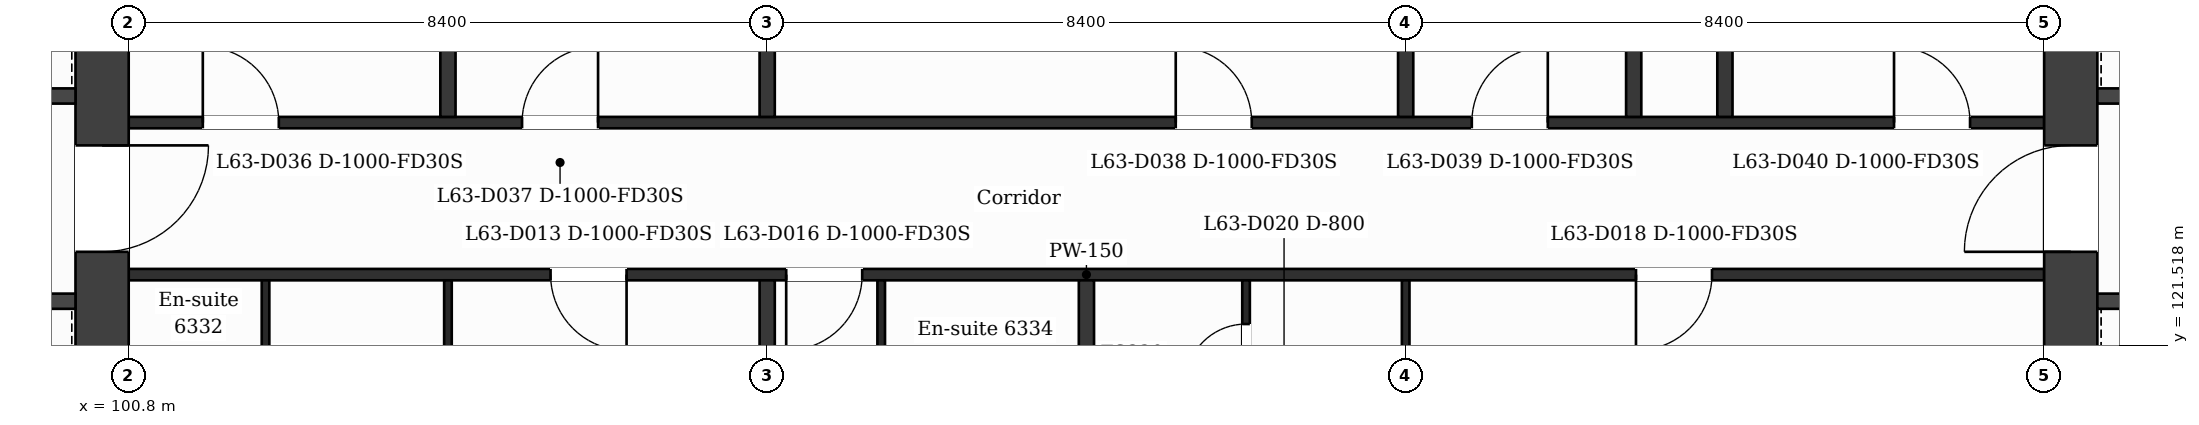
"""IFC4 building model, lengths in metres.
Left out: names, types, materials, properties, quantities, classifications, styles, units other than length and angle.
Written with IfcOpenShell. Run it as: python <this file> out.ifc"""

import sys

from ifc_helpers import new_model, si_unit, direction, frame, frame_2d, origin, place, context, subcontext, project, spatial, rectangle, extrude, element, fill, save


model = new_model("IFC4")
c1 = context("Model", 3, precision=1e-05, world=origin(), true_north=direction((0.0, 1.0)))
c2 = subcontext(c1, "Body", "Model", "MODEL_VIEW")
j1 = project(units=[si_unit("LENGTHUNIT", "METRE"), si_unit("PLANEANGLEUNIT", "RADIAN")], contexts=[c1])
p1 = place(None, origin())
s1 = spatial("IfcSite", under=j1, at=p1, CompositionType="ELEMENT")
p2 = place(p1, origin())
s2 = spatial("IfcBuilding", under=s1, at=p2, CompositionType="ELEMENT")
p3 = place(p2, frame((0.0, 0.0, 262.7)))
s3 = spatial("IfcBuildingStorey", under=s2, at=p3, CompositionType="ELEMENT", Elevation=262.7)
p4 = place(p3, frame((100.45, 132.05, 0.0), z_axis=(0.0, 0.0, 1.0), x_axis=(0.0, -1.0, 0.0)))
e1 = element("IfcWall", 1, at=p4, inside=s3, PredefinedType="SHEAR", context=c2, shape_type="SweptSolid", body=[
    extrude(rectangle(XDim=21.3, YDim=0.7, at=frame_2d((10.65, 0.0))), origin(), (0.0, 0.0, 1.0), 3.7),
])
p5 = place(p4, frame((7.9, 0.0, 0.0)))
e2 = element("IfcOpeningElement", 2, at=p5, cuts=e1, PredefinedType="OPENING", context=c2, shape_type="SweptSolid", body=[
    extrude(rectangle(XDim=1.4, YDim=2.1, at=frame_2d((0.7, 1.05))), frame((0.0, 0.36, 0.0), z_axis=(0.0, -1.0, 0.0), x_axis=(1.0, 0.0, 0.0)), (0.0, 0.0, 1.0), 0.72),
])
p6 = place(p3, frame((126.35, 110.75, 0.0), z_axis=(0.0, 0.0, 1.0), x_axis=(0.0, 1.0, 0.0)))
e3 = element("IfcWall", 3, at=p6, inside=s3, PredefinedType="SHEAR", context=c2, shape_type="SweptSolid", body=[
    extrude(rectangle(XDim=21.3, YDim=0.7, at=frame_2d((10.65, 0.0))), origin(), (0.0, 0.0, 1.0), 3.7),
])
p7 = place(p6, frame((12.0, 0.0, 0.0)))
e4 = element("IfcOpeningElement", 4, at=p7, cuts=e3, PredefinedType="OPENING", context=c2, shape_type="SweptSolid", body=[
    extrude(rectangle(XDim=1.4, YDim=2.1, at=frame_2d((0.7, 1.05))), frame((0.0, 0.36, 0.0), z_axis=(0.0, -1.0, 0.0), x_axis=(1.0, 0.0, 0.0)), (0.0, 0.0, 1.0), 0.72),
])
p8 = place(p3, frame((95.227, 122.1, 0.0), z_axis=(0.0, 0.0, 1.0), x_axis=(1.0, 0.0, 0.0)))
e5 = element("IfcWall", 5, at=p8, inside=s3, PredefinedType="PARTITIONING", context=c2, shape_type="SweptSolid", body=[
    extrude(rectangle(XDim=4.873, YDim=0.2, at=frame_2d((2.437, 0.0))), origin(), (0.0, 0.0, 1.0), 3.38),
])
p9 = place(p8, frame((0.827, 0.0, 0.0)))
e6 = element("IfcOpeningElement", 6, at=p9, cuts=e5, PredefinedType="OPENING", context=c2, shape_type="SweptSolid", body=[
    extrude(rectangle(XDim=1.1, YDim=2.1, at=frame_2d((0.55, 1.05))), frame((0.0, 0.11, 0.0), z_axis=(0.0, -1.0, 0.0), x_axis=(1.0, 0.0, 0.0)), (0.0, 0.0, 1.0), 0.22),
])
p10 = place(p8, frame((2.946, 0.0, 0.0)))
e7 = element("IfcOpeningElement", 7, at=p10, cuts=e5, PredefinedType="OPENING", context=c2, shape_type="SweptSolid", body=[
    extrude(rectangle(XDim=1.1, YDim=2.1, at=frame_2d((0.55, 1.05))), frame((0.0, 0.11, 0.0), z_axis=(0.0, -1.0, 0.0), x_axis=(1.0, 0.0, 0.0)), (0.0, 0.0, 1.0), 0.22),
])
p11 = place(p3, frame((126.7, 122.1, 0.0), z_axis=(0.0, 0.0, 1.0), x_axis=(1.0, 0.0, 0.0)))
e8 = element("IfcWall", 8, at=p11, inside=s3, PredefinedType="PARTITIONING", context=c2, shape_type="SweptSolid", body=[
    extrude(rectangle(XDim=4.873, YDim=0.2, at=frame_2d((2.437, 0.0))), origin(), (0.0, 0.0, 1.0), 3.38),
])
p12 = place(p11, frame((3.105, 0.0, 0.0)))
e9 = element("IfcOpeningElement", 9, at=p12, cuts=e8, PredefinedType="OPENING", context=c2, shape_type="SweptSolid", body=[
    extrude(rectangle(XDim=1.1, YDim=2.1, at=frame_2d((0.55, 1.05))), frame((0.0, 0.11, 0.0), z_axis=(0.0, -1.0, 0.0), x_axis=(1.0, 0.0, 0.0)), (0.0, 0.0, 1.0), 0.22),
])
p13 = place(p11, frame((0.509, 0.0, 0.0)))
e10 = element("IfcOpeningElement", 10, at=p13, cuts=e8, PredefinedType="OPENING", context=c2, shape_type="SweptSolid", body=[
    extrude(rectangle(XDim=1.1, YDim=2.1, at=frame_2d((0.55, 1.05))), frame((0.0, 0.11, 0.0), z_axis=(0.0, -1.0, 0.0), x_axis=(1.0, 0.0, 0.0)), (0.0, 0.0, 1.0), 0.22),
])
p14 = place(p3, frame((100.8, 122.45, 0.0), z_axis=(0.0, 0.0, 1.0), x_axis=(1.0, 0.0, 0.0)))
e11 = element("IfcWall", 11, at=p14, inside=s3, PredefinedType="PARTITIONING", context=c2, shape_type="SweptSolid", body=[
    extrude(rectangle(XDim=25.2, YDim=0.15, at=frame_2d((12.6, 0.0))), origin(), (0.0, 0.0, 1.0), 3.38),
])
p15 = place(p14, frame((5.55, 0.0, 0.0)))
e12 = element("IfcOpeningElement", 12, at=p15, cuts=e11, PredefinedType="OPENING", context=c2, shape_type="SweptSolid", body=[
    extrude(rectangle(XDim=1.0, YDim=2.1, at=frame_2d((0.5, 1.05))), frame((0.0, 0.085, 0.0), z_axis=(0.0, -1.0, 0.0), x_axis=(1.0, 0.0, 0.0)), (0.0, 0.0, 1.0), 0.17),
])
p16 = place(p14, frame((8.65, 0.0, 0.0)))
e13 = element("IfcOpeningElement", 13, at=p16, cuts=e11, PredefinedType="OPENING", context=c2, shape_type="SweptSolid", body=[
    extrude(rectangle(XDim=1.0, YDim=2.1, at=frame_2d((0.5, 1.05))), frame((0.0, 0.085, 0.0), z_axis=(0.0, -1.0, 0.0), x_axis=(1.0, 0.0, 0.0)), (0.0, 0.0, 1.0), 0.17),
])
p17 = place(p14, frame((19.83, 0.0, 0.0)))
e14 = element("IfcOpeningElement", 14, at=p17, cuts=e11, PredefinedType="OPENING", context=c2, shape_type="SweptSolid", body=[
    extrude(rectangle(XDim=1.0, YDim=2.1, at=frame_2d((0.5, 1.05))), frame((0.0, 0.085, 0.0), z_axis=(0.0, -1.0, 0.0), x_axis=(1.0, 0.0, 0.0)), (0.0, 0.0, 1.0), 0.17),
])
p18 = place(p3, frame((100.8, 124.45, 0.0), z_axis=(0.0, 0.0, 1.0), x_axis=(1.0, 0.0, 0.0)))
e15 = element("IfcWall", 15, at=p18, inside=s3, PredefinedType="PARTITIONING", context=c2, shape_type="SweptSolid", body=[
    extrude(rectangle(XDim=25.2, YDim=0.15, at=frame_2d((12.6, 0.0))), origin(), (0.0, 0.0, 1.0), 3.38),
])
p19 = place(p18, frame((0.975, 0.0, 0.0)))
e16 = element("IfcOpeningElement", 16, at=p19, cuts=e15, PredefinedType="OPENING", context=c2, shape_type="SweptSolid", body=[
    extrude(rectangle(XDim=1.0, YDim=2.1, at=frame_2d((0.5, 1.05))), frame((0.0, 0.085, 0.0), z_axis=(0.0, -1.0, 0.0), x_axis=(1.0, 0.0, 0.0)), (0.0, 0.0, 1.0), 0.17),
])
p20 = place(p18, frame((5.175, 0.0, 0.0)))
e17 = element("IfcOpeningElement", 17, at=p20, cuts=e15, PredefinedType="OPENING", context=c2, shape_type="SweptSolid", body=[
    extrude(rectangle(XDim=1.0, YDim=2.1, at=frame_2d((0.5, 1.05))), frame((0.0, 0.085, 0.0), z_axis=(0.0, -1.0, 0.0), x_axis=(1.0, 0.0, 0.0)), (0.0, 0.0, 1.0), 0.17),
])
p21 = place(p18, frame((13.775, 0.0, 0.0)))
e18 = element("IfcOpeningElement", 18, at=p21, cuts=e15, PredefinedType="OPENING", context=c2, shape_type="SweptSolid", body=[
    extrude(rectangle(XDim=1.0, YDim=2.1, at=frame_2d((0.5, 1.05))), frame((0.0, 0.085, 0.0), z_axis=(0.0, -1.0, 0.0), x_axis=(1.0, 0.0, 0.0)), (0.0, 0.0, 1.0), 0.17),
])
p22 = place(p18, frame((17.67, 0.0, 0.0)))
e19 = element("IfcOpeningElement", 19, at=p22, cuts=e15, PredefinedType="OPENING", context=c2, shape_type="SweptSolid", body=[
    extrude(rectangle(XDim=1.0, YDim=2.1, at=frame_2d((0.5, 1.05))), frame((0.0, 0.085, 0.0), z_axis=(0.0, -1.0, 0.0), x_axis=(1.0, 0.0, 0.0)), (0.0, 0.0, 1.0), 0.17),
])
p23 = place(p18, frame((23.225, 0.0, 0.0)))
e20 = element("IfcOpeningElement", 20, at=p23, cuts=e15, PredefinedType="OPENING", context=c2, shape_type="SweptSolid", body=[
    extrude(rectangle(XDim=1.0, YDim=2.1, at=frame_2d((0.5, 1.05))), frame((0.0, 0.085, 0.0), z_axis=(0.0, -1.0, 0.0), x_axis=(1.0, 0.0, 0.0)), (0.0, 0.0, 1.0), 0.17),
])
p24 = place(p3, frame((92.702, 124.8, 0.0), z_axis=(0.0, 0.0, 1.0), x_axis=(1.0, 0.0, 0.0)))
e21 = element("IfcWall", 21, at=p24, inside=s3, PredefinedType="PARTITIONING", context=c2, shape_type="SweptSolid", body=[
    extrude(rectangle(XDim=7.398, YDim=0.2, at=frame_2d((3.699, 0.0))), origin(), (0.0, 0.0, 1.0), 3.38),
])
p25 = place(p24, frame((5.636, 0.0, 0.0)))
e22 = element("IfcOpeningElement", 22, at=p25, cuts=e21, PredefinedType="OPENING", context=c2, shape_type="SweptSolid", body=[
    extrude(rectangle(XDim=1.1, YDim=2.1, at=frame_2d((0.55, 1.05))), frame((0.0, 0.11, 0.0), z_axis=(0.0, -1.0, 0.0), x_axis=(1.0, 0.0, 0.0)), (0.0, 0.0, 1.0), 0.22),
])
p26 = place(p3, frame((126.7, 124.8, 0.0), z_axis=(0.0, 0.0, 1.0), x_axis=(1.0, 0.0, 0.0)))
e23 = element("IfcWall", 23, at=p26, inside=s3, PredefinedType="PARTITIONING", context=c2, shape_type="SweptSolid", body=[
    extrude(rectangle(XDim=4.849, YDim=0.2, at=frame_2d((2.424, 0.0))), origin(), (0.0, 0.0, 1.0), 3.38),
])
p27 = place(p26, frame((0.725, 0.0, 0.0)))
e24 = element("IfcOpeningElement", 24, at=p27, cuts=e23, PredefinedType="OPENING", context=c2, shape_type="SweptSolid", body=[
    extrude(rectangle(XDim=1.1, YDim=2.1, at=frame_2d((0.55, 1.05))), frame((0.0, 0.11, 0.0), z_axis=(0.0, -1.0, 0.0), x_axis=(1.0, 0.0, 0.0)), (0.0, 0.0, 1.0), 0.22),
])
p28 = place(p3, frame((102.6, 119.8, 0.0), z_axis=(0.0, 0.0, 1.0), x_axis=(0.0, 1.0, 0.0)))
e25 = element("IfcWall", 25, at=p28, inside=s3, PredefinedType="PARTITIONING", context=c2, shape_type="SweptSolid", body=[
    extrude(rectangle(XDim=2.575, YDim=0.1, at=frame_2d((1.288, 0.0))), origin(), (0.0, 0.0, 1.0), 3.38),
])
p29 = place(p28, frame((0.78, 0.0, 0.0)))
e26 = element("IfcOpeningElement", 26, at=p29, cuts=e25, PredefinedType="OPENING", context=c2, shape_type="SweptSolid", body=[
    extrude(rectangle(XDim=0.8, YDim=2.1, at=frame_2d((0.4, 1.05))), frame((0.0, 0.06, 0.0), z_axis=(0.0, -1.0, 0.0), x_axis=(1.0, 0.0, 0.0)), (0.0, 0.0, 1.0), 0.12),
])
p30 = place(p3, frame((105.0, 110.55, 0.0), z_axis=(0.0, 0.0, 1.0), x_axis=(0.0, 1.0, 0.0)))
e27 = element("IfcWall", 27, at=p30, inside=s3, PredefinedType="PARTITIONING", context=c2, shape_type="SweptSolid", body=[
    extrude(rectangle(XDim=11.825, YDim=0.1, at=frame_2d((5.913, 0.0))), origin(), (0.0, 0.0, 1.0), 3.38),
])
p31 = place(p30, frame((9.09, 0.0, 0.0)))
e28 = element("IfcOpeningElement", 28, at=p31, cuts=e27, PredefinedType="OPENING", context=c2, shape_type="SweptSolid", body=[
    extrude(rectangle(XDim=0.9, YDim=2.1, at=frame_2d((0.45, 1.05))), frame((0.0, 0.06, 0.0), z_axis=(0.0, -1.0, 0.0), x_axis=(1.0, 0.0, 0.0)), (0.0, 0.0, 1.0), 0.12),
])
p32 = place(p3, frame((105.0, 124.525, 0.0), z_axis=(0.0, 0.0, 1.0), x_axis=(0.0, 1.0, 0.0)))
e29 = element("IfcWall", 29, at=p32, inside=s3, PredefinedType="PARTITIONING", context=c2, shape_type="SweptSolid", body=[
    extrude(rectangle(XDim=9.2, YDim=0.2, at=frame_2d((4.6, 0.0))), origin(), (0.0, 0.0, 1.0), 3.38),
])
p33 = place(p3, frame((109.2, 110.55, 0.0), z_axis=(0.0, 0.0, 1.0), x_axis=(0.0, 1.0, 0.0)))
e30 = element("IfcWall", 30, at=p33, inside=s3, PredefinedType="PARTITIONING", context=c2, shape_type="SweptSolid", body=[
    extrude(rectangle(XDim=11.825, YDim=0.2, at=frame_2d((5.913, 0.0))), origin(), (0.0, 0.0, 1.0), 3.38),
])
p34 = place(p3, frame((109.2, 124.525, 0.0), z_axis=(0.0, 0.0, 1.0), x_axis=(0.0, 1.0, 0.0)))
e31 = element("IfcWall", 31, at=p34, inside=s3, PredefinedType="PARTITIONING", context=c2, shape_type="SweptSolid", body=[
    extrude(rectangle(XDim=9.2, YDim=0.2, at=frame_2d((4.6, 0.0))), origin(), (0.0, 0.0, 1.0), 3.38),
])
p35 = place(p3, frame((110.7, 120.4, 0.0), z_axis=(0.0, 0.0, 1.0), x_axis=(0.0, 1.0, 0.0)))
e32 = element("IfcWall", 32, at=p35, inside=s3, PredefinedType="PARTITIONING", context=c2, shape_type="SweptSolid", body=[
    extrude(rectangle(XDim=1.975, YDim=0.1, at=frame_2d((0.988, 0.0))), origin(), (0.0, 0.0, 1.0), 3.38),
])
p36 = place(p3, frame((113.4, 110.55, 0.0), z_axis=(0.0, 0.0, 1.0), x_axis=(0.0, 1.0, 0.0)))
e33 = element("IfcWall", 33, at=p36, inside=s3, PredefinedType="PARTITIONING", context=c2, shape_type="SweptSolid", body=[
    extrude(rectangle(XDim=11.825, YDim=0.2, at=frame_2d((5.913, 0.0))), origin(), (0.0, 0.0, 1.0), 3.38),
])
p37 = place(p3, frame((115.5, 119.8, 0.0), z_axis=(0.0, 0.0, 1.0), x_axis=(0.0, 1.0, 0.0)))
e34 = element("IfcWall", 34, at=p37, inside=s3, PredefinedType="PARTITIONING", context=c2, shape_type="SweptSolid", body=[
    extrude(rectangle(XDim=2.575, YDim=0.1, at=frame_2d((1.288, 0.0))), origin(), (0.0, 0.0, 1.0), 3.38),
])
p38 = place(p37, frame((1.2, 0.0, 0.0)))
e35 = element("IfcOpeningElement", 35, at=p38, cuts=e34, PredefinedType="OPENING", context=c2, shape_type="SweptSolid", body=[
    extrude(rectangle(XDim=0.8, YDim=2.1, at=frame_2d((0.4, 1.05))), frame((0.0, 0.06, 0.0), z_axis=(0.0, -1.0, 0.0), x_axis=(1.0, 0.0, 0.0)), (0.0, 0.0, 1.0), 0.12),
])
p39 = place(p3, frame((117.6, 110.55, 0.0), z_axis=(0.0, 0.0, 1.0), x_axis=(0.0, 1.0, 0.0)))
e36 = element("IfcWall", 36, at=p39, inside=s3, PredefinedType="PARTITIONING", context=c2, shape_type="SweptSolid", body=[
    extrude(rectangle(XDim=11.825, YDim=0.1, at=frame_2d((5.913, 0.0))), origin(), (0.0, 0.0, 1.0), 3.38),
])
p40 = place(p39, frame((9.09, 0.0, 0.0)))
e37 = element("IfcOpeningElement", 37, at=p40, cuts=e36, PredefinedType="OPENING", context=c2, shape_type="SweptSolid", body=[
    extrude(rectangle(XDim=0.9, YDim=2.1, at=frame_2d((0.45, 1.05))), frame((0.0, 0.06, 0.0), z_axis=(0.0, -1.0, 0.0), x_axis=(1.0, 0.0, 0.0)), (0.0, 0.0, 1.0), 0.12),
])
p41 = place(p3, frame((117.6, 124.525, 0.0), z_axis=(0.0, 0.0, 1.0), x_axis=(0.0, 1.0, 0.0)))
e38 = element("IfcWall", 38, at=p41, inside=s3, PredefinedType="PARTITIONING", context=c2, shape_type="SweptSolid", body=[
    extrude(rectangle(XDim=9.2, YDim=0.2, at=frame_2d((4.6, 0.0))), origin(), (0.0, 0.0, 1.0), 3.38),
])
p42 = place(p3, frame((120.6, 124.525, 0.0), z_axis=(0.0, 0.0, 1.0), x_axis=(0.0, 1.0, 0.0)))
e39 = element("IfcWall", 39, at=p42, inside=s3, PredefinedType="PARTITIONING", context=c2, shape_type="SweptSolid", body=[
    extrude(rectangle(XDim=5.825, YDim=0.2, at=frame_2d((2.913, 0.0))), origin(), (0.0, 0.0, 1.0), 3.38),
])
p43 = place(p3, frame((121.8, 124.525, 0.0), z_axis=(0.0, 0.0, 1.0), x_axis=(0.0, 1.0, 0.0)))
e40 = element("IfcWall", 40, at=p43, inside=s3, PredefinedType="PARTITIONING", context=c2, shape_type="SweptSolid", body=[
    extrude(rectangle(XDim=9.2, YDim=0.2, at=frame_2d((4.6, 0.0))), origin(), (0.0, 0.0, 1.0), 3.38),
])
p44 = place(p15, origin())
e41 = element("IfcDoor", 41, at=p44, inside=s3, OperationType="SINGLE_SWING_RIGHT", PredefinedType="DOOR", context=c2, shape_type="SweptSolid", body=[
    extrude(rectangle(XDim=1.0, YDim=2.1, at=frame_2d((0.5, 1.05))), frame((0.0, 0.025, 0.0), z_axis=(0.0, -1.0, 0.0), x_axis=(1.0, 0.0, 0.0)), (0.0, 0.0, 1.0), 0.05),
])
fill(e12, e41)
p45 = place(p16, origin())
e42 = element("IfcDoor", 42, at=p45, inside=s3, OperationType="SINGLE_SWING_LEFT", PredefinedType="DOOR", context=c2, shape_type="SweptSolid", body=[
    extrude(rectangle(XDim=1.0, YDim=2.1, at=frame_2d((0.5, 1.05))), frame((0.0, 0.025, 0.0), z_axis=(0.0, -1.0, 0.0), x_axis=(1.0, 0.0, 0.0)), (0.0, 0.0, 1.0), 0.05),
])
fill(e13, e42)
p46 = place(p17, origin())
e43 = element("IfcDoor", 43, at=p46, inside=s3, OperationType="SINGLE_SWING_LEFT", PredefinedType="DOOR", context=c2, shape_type="SweptSolid", body=[
    extrude(rectangle(XDim=1.0, YDim=2.1, at=frame_2d((0.5, 1.05))), frame((0.0, 0.025, 0.0), z_axis=(0.0, -1.0, 0.0), x_axis=(1.0, 0.0, 0.0)), (0.0, 0.0, 1.0), 0.05),
])
fill(e14, e43)
p47 = place(p38, origin())
e44 = element("IfcDoor", 44, at=p47, inside=s3, OperationType="SINGLE_SWING_LEFT", PredefinedType="DOOR", context=c2, shape_type="SweptSolid", body=[
    extrude(rectangle(XDim=0.8, YDim=2.1, at=frame_2d((0.4, 1.05))), frame((0.0, 0.025, 0.0), z_axis=(0.0, -1.0, 0.0), x_axis=(1.0, 0.0, 0.0)), (0.0, 0.0, 1.0), 0.05),
])
fill(e35, e44)
p48 = place(p19, origin())
e45 = element("IfcDoor", 45, at=p48, inside=s3, OperationType="SINGLE_SWING_LEFT", PredefinedType="DOOR", context=c2, shape_type="SweptSolid", body=[
    extrude(rectangle(XDim=1.0, YDim=2.1, at=frame_2d((0.5, 1.05))), frame((0.0, 0.025, 0.0), z_axis=(0.0, -1.0, 0.0), x_axis=(1.0, 0.0, 0.0)), (0.0, 0.0, 1.0), 0.05),
])
fill(e16, e45)
p49 = place(p20, origin())
e46 = element("IfcDoor", 46, at=p49, inside=s3, OperationType="SINGLE_SWING_RIGHT", PredefinedType="DOOR", context=c2, shape_type="SweptSolid", body=[
    extrude(rectangle(XDim=1.0, YDim=2.1, at=frame_2d((0.5, 1.05))), frame((0.0, 0.025, 0.0), z_axis=(0.0, -1.0, 0.0), x_axis=(1.0, 0.0, 0.0)), (0.0, 0.0, 1.0), 0.05),
])
fill(e17, e46)
p50 = place(p21, origin())
e47 = element("IfcDoor", 47, at=p50, inside=s3, OperationType="SINGLE_SWING_LEFT", PredefinedType="DOOR", context=c2, shape_type="SweptSolid", body=[
    extrude(rectangle(XDim=1.0, YDim=2.1, at=frame_2d((0.5, 1.05))), frame((0.0, 0.025, 0.0), z_axis=(0.0, -1.0, 0.0), x_axis=(1.0, 0.0, 0.0)), (0.0, 0.0, 1.0), 0.05),
])
fill(e18, e47)
p51 = place(p22, origin())
e48 = element("IfcDoor", 48, at=p51, inside=s3, OperationType="SINGLE_SWING_RIGHT", PredefinedType="DOOR", context=c2, shape_type="SweptSolid", body=[
    extrude(rectangle(XDim=1.0, YDim=2.1, at=frame_2d((0.5, 1.05))), frame((0.0, 0.025, 0.0), z_axis=(0.0, -1.0, 0.0), x_axis=(1.0, 0.0, 0.0)), (0.0, 0.0, 1.0), 0.05),
])
fill(e19, e48)
p52 = place(p23, origin())
e49 = element("IfcDoor", 49, at=p52, inside=s3, OperationType="SINGLE_SWING_LEFT", PredefinedType="DOOR", context=c2, shape_type="SweptSolid", body=[
    extrude(rectangle(XDim=1.0, YDim=2.1, at=frame_2d((0.5, 1.05))), frame((0.0, 0.025, 0.0), z_axis=(0.0, -1.0, 0.0), x_axis=(1.0, 0.0, 0.0)), (0.0, 0.0, 1.0), 0.05),
])
fill(e20, e49)
p53 = place(p5, origin())
e50 = element("IfcDoor", 50, at=p53, inside=s3, OperationType="SINGLE_SWING_LEFT", PredefinedType="DOOR", context=c2, shape_type="SweptSolid", body=[
    extrude(rectangle(XDim=1.4, YDim=2.1, at=frame_2d((0.7, 1.05))), frame((0.0, 0.025, 0.0), z_axis=(0.0, -1.0, 0.0), x_axis=(1.0, 0.0, 0.0)), (0.0, 0.0, 1.0), 0.05),
])
fill(e2, e50)
p54 = place(p7, origin())
e51 = element("IfcDoor", 51, at=p54, inside=s3, OperationType="SINGLE_SWING_LEFT", PredefinedType="DOOR", context=c2, shape_type="SweptSolid", body=[
    extrude(rectangle(XDim=1.4, YDim=2.1, at=frame_2d((0.7, 1.05))), frame((0.0, 0.025, 0.0), z_axis=(0.0, -1.0, 0.0), x_axis=(1.0, 0.0, 0.0)), (0.0, 0.0, 1.0), 0.05),
])
fill(e4, e51)
save(model, sys.argv[1])
